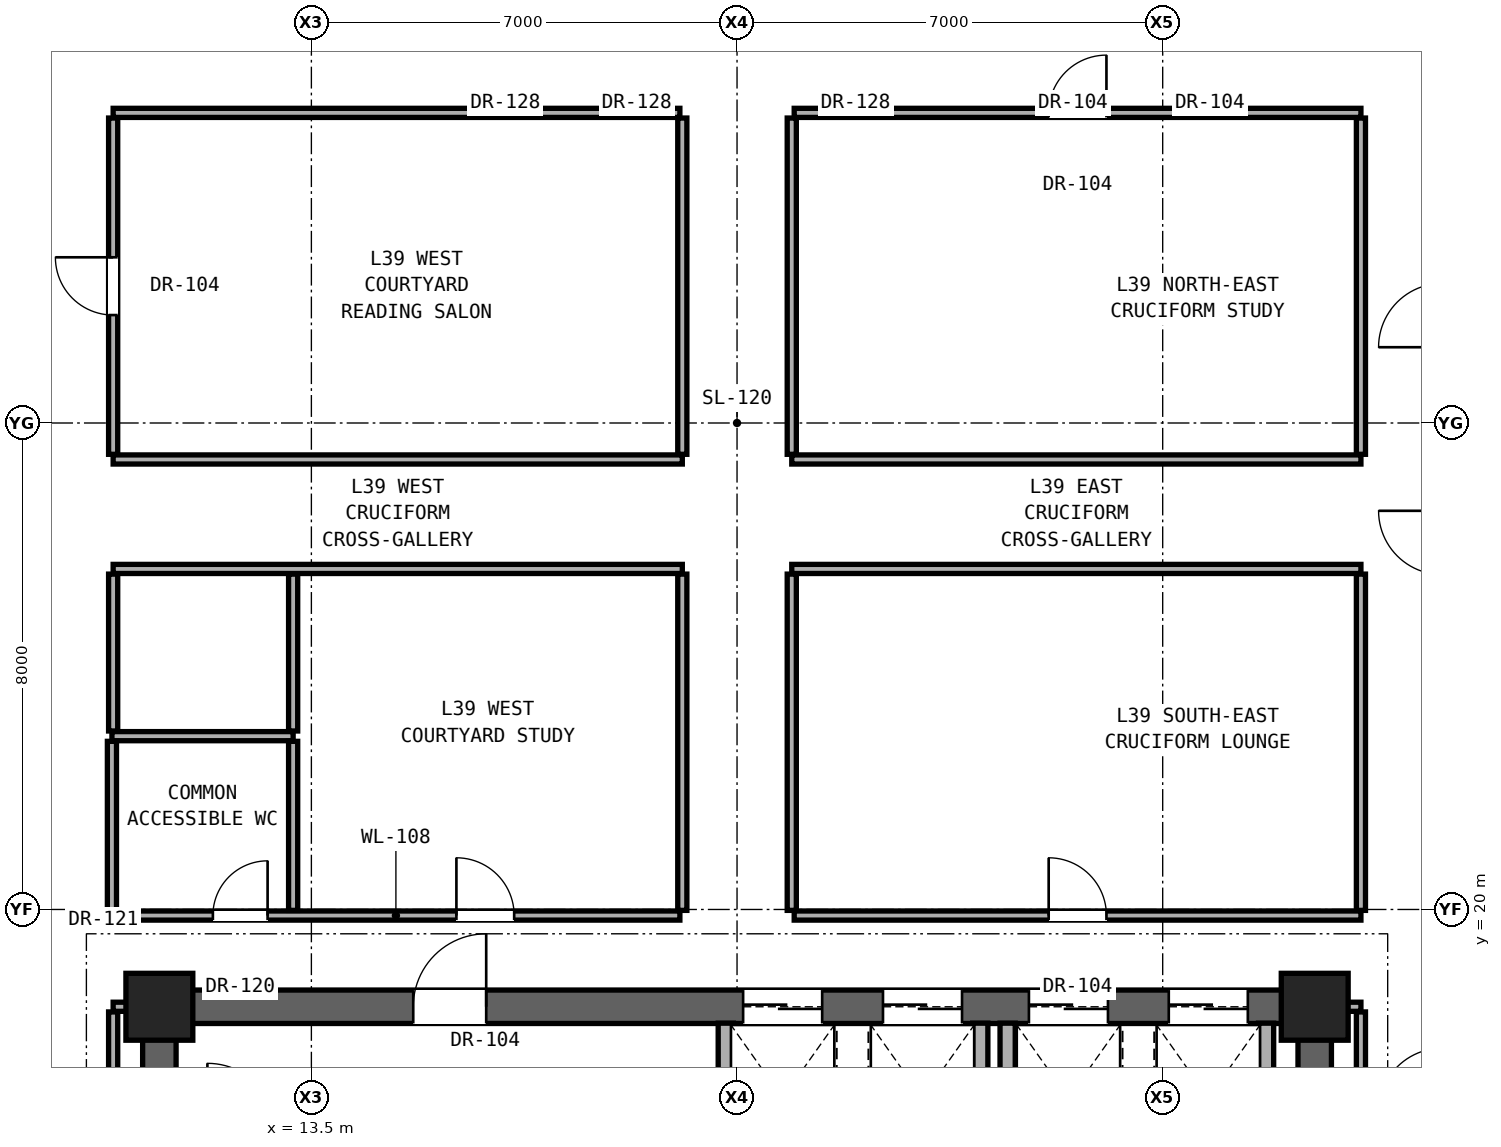
"""IFC4 building model, lengths in metres.
Left out: names, types, materials, properties, quantities, classifications, styles, units other than length and angle.
Written with IfcOpenShell. Run it as: python <this file> out.ifc"""

import sys

from ifc_helpers import new_model, si_unit, direction, frame, frame_2d, origin, origin_2d, place, context, subcontext, project, spatial, rectangle, extrude, element, fill, save


model = new_model("IFC4")
c1 = context("Model", 3, precision=1e-05, world=origin(), true_north=direction((0.0, 1.0)))
c2 = subcontext(c1, "Body", "Model", "MODEL_VIEW")
j1 = project(units=[si_unit("LENGTHUNIT", "METRE"), si_unit("PLANEANGLEUNIT", "RADIAN")], contexts=[c1])
p1 = place(None, origin())
s1 = spatial("IfcSite", under=j1, at=p1, CompositionType="ELEMENT")
p2 = place(p1, origin())
s2 = spatial("IfcBuilding", under=s1, at=p2, CompositionType="ELEMENT")
p3 = place(p2, frame((0.0, 0.0, 137.9)))
s3 = spatial("IfcBuildingStorey", under=s2, at=p3, CompositionType="ELEMENT", Elevation=137.9)
for number, where, z_axis, x_axis in (
    (1, (11.0, 18.4, 0.0), (0.0, 0.0, 1.0), (1.0, 0.0, 0.0)),
    (2, (30.0, 18.4, 0.0), (0.0, 0.0, 1.0), (1.0, 0.0, 0.0)),
):
    element("IfcColumn", number, at=place(p3, frame(where, z_axis=z_axis, x_axis=x_axis)), inside=s3, PredefinedType="COLUMN", context=c2, shape_type="SweptSolid", body=[
        extrude(rectangle(XDim=1.1, YDim=1.1, at=origin_2d()), origin(), (0.0, 0.0, 1.0), 3.3),
    ])
for number, where, z_axis, x_axis in (
    (3, (11.0, 12.4, 0.0), (0.0, 0.0, 1.0), (0.0, 1.0, 0.0)),
    (4, (30.0, 12.4, 0.0), (0.0, 0.0, 1.0), (0.0, 1.0, 0.0)),
):
    element("IfcWall", number, at=place(p3, frame(where, z_axis=z_axis, x_axis=x_axis)), inside=s3, PredefinedType="SHEAR", context=c2, shape_type="SweptSolid", body=[
        extrude(rectangle(XDim=6.0, YDim=0.55, at=frame_2d((3.0, 0.0))), origin(), (0.0, 0.0, 1.0), 3.08),
    ])
p4 = place(p3, frame((11.0, 18.4, 0.0), z_axis=(0.0, 0.0, 1.0), x_axis=(1.0, 0.0, 0.0)))
e5 = element("IfcWall", 5, at=p4, inside=s3, PredefinedType="SHEAR", context=c2, shape_type="SweptSolid", body=[
    extrude(rectangle(XDim=19.0, YDim=0.55, at=frame_2d((9.5, 0.0))), origin(), (0.0, 0.0, 1.0), 3.08),
])
p5 = place(p4, frame((4.175, 0.0, 0.0)))
e6 = element("IfcOpeningElement", 6, at=p5, cuts=e5, PredefinedType="OPENING", context=c2, shape_type="SweptSolid", body=[
    extrude(rectangle(XDim=1.2, YDim=2.25, at=frame_2d((0.6, 1.125))), frame((0.0, 0.285, 0.0), z_axis=(0.0, -1.0, 0.0), x_axis=(1.0, 0.0, 0.0)), (0.0, 0.0, 1.0), 0.57),
])
p6 = place(p4, frame((9.6, 0.0, 0.0)))
e7 = element("IfcOpeningElement", 7, at=p6, cuts=e5, PredefinedType="OPENING", context=c2, shape_type="SweptSolid", body=[
    extrude(rectangle(XDim=1.3, YDim=2.3, at=frame_2d((0.65, 1.15))), frame((0.0, 0.285, 0.0), z_axis=(0.0, -1.0, 0.0), x_axis=(1.0, 0.0, 0.0)), (0.0, 0.0, 1.0), 0.57),
])
p7 = place(p4, frame((11.9, 0.0, 0.0)))
e8 = element("IfcOpeningElement", 8, at=p7, cuts=e5, PredefinedType="OPENING", context=c2, shape_type="SweptSolid", body=[
    extrude(rectangle(XDim=1.3, YDim=2.3, at=frame_2d((0.65, 1.15))), frame((0.0, 0.285, 0.0), z_axis=(0.0, -1.0, 0.0), x_axis=(1.0, 0.0, 0.0)), (0.0, 0.0, 1.0), 0.57),
])
p8 = place(p4, frame((14.3, 0.0, 0.0)))
e9 = element("IfcOpeningElement", 9, at=p8, cuts=e5, PredefinedType="OPENING", context=c2, shape_type="SweptSolid", body=[
    extrude(rectangle(XDim=1.3, YDim=2.3, at=frame_2d((0.65, 1.15))), frame((0.0, 0.285, 0.0), z_axis=(0.0, -1.0, 0.0), x_axis=(1.0, 0.0, 0.0)), (0.0, 0.0, 1.0), 0.57),
])
p9 = place(p4, frame((16.6, 0.0, 0.0)))
e10 = element("IfcOpeningElement", 10, at=p9, cuts=e5, PredefinedType="OPENING", context=c2, shape_type="SweptSolid", body=[
    extrude(rectangle(XDim=1.3, YDim=2.3, at=frame_2d((0.65, 1.15))), frame((0.0, 0.285, 0.0), z_axis=(0.0, -1.0, 0.0), x_axis=(1.0, 0.0, 0.0)), (0.0, 0.0, 1.0), 0.57),
])
for number, where, z_axis, x_axis in (
    (11, (10.24, 18.4, 0.0), (0.0, 0.0, 1.0), (1.0, 0.0, 0.0)),
    (12, (30.27, 18.4, 0.0), (0.0, 0.0, 1.0), (1.0, 0.0, 0.0)),
):
    element("IfcWall", number, at=place(p3, frame(where, z_axis=z_axis, x_axis=x_axis)), inside=s3, PredefinedType="PARTITIONING", context=c2, shape_type="SweptSolid", body=[
        extrude(rectangle(XDim=0.49, YDim=0.15, at=frame_2d((0.245, 0.0))), origin(), (0.0, 0.0, 1.0), 2.456),
    ])
p10 = place(p3, frame((10.22, 19.9, 0.0), z_axis=(0.0, 0.0, 1.0), x_axis=(1.0, 0.0, 0.0)))
e13 = element("IfcWall", 13, at=p10, inside=s3, PredefinedType="PARTITIONING", context=c2, shape_type="SweptSolid", body=[
    extrude(rectangle(XDim=9.34, YDim=0.15, at=frame_2d((4.67, 0.0))), origin(), (0.0, 0.0, 1.0), 2.216),
])
p11 = place(p10, frame((1.66, 0.0, 0.0)))
e14 = element("IfcOpeningElement", 14, at=p11, cuts=e13, PredefinedType="OPENING", context=c2, shape_type="SweptSolid", body=[
    extrude(rectangle(XDim=0.9, YDim=2.1, at=frame_2d((0.45, 1.05))), frame((0.0, 0.085, 0.0), z_axis=(0.0, -1.0, 0.0), x_axis=(1.0, 0.0, 0.0)), (0.0, 0.0, 1.0), 0.17),
])
p12 = place(p10, frame((5.665, 0.0, 0.0)))
e15 = element("IfcOpeningElement", 15, at=p12, cuts=e13, PredefinedType="OPENING", context=c2, shape_type="SweptSolid", body=[
    extrude(rectangle(XDim=0.95, YDim=2.15, at=frame_2d((0.475, 1.075))), frame((0.0, 0.085, 0.0), z_axis=(0.0, -1.0, 0.0), x_axis=(1.0, 0.0, 0.0)), (0.0, 0.0, 1.0), 0.17),
])
p13 = place(p3, frame((21.44, 19.9, 0.0), z_axis=(0.0, 0.0, 1.0), x_axis=(1.0, 0.0, 0.0)))
e16 = element("IfcWall", 16, at=p13, inside=s3, PredefinedType="PARTITIONING", context=c2, shape_type="SweptSolid", body=[
    extrude(rectangle(XDim=9.32, YDim=0.15, at=frame_2d((4.66, 0.0))), origin(), (0.0, 0.0, 1.0), 2.216),
])
p14 = place(p13, frame((4.185, 0.0, 0.0)))
e17 = element("IfcOpeningElement", 17, at=p14, cuts=e16, PredefinedType="OPENING", context=c2, shape_type="SweptSolid", body=[
    extrude(rectangle(XDim=0.95, YDim=2.15, at=frame_2d((0.475, 1.075))), frame((0.0, 0.085, 0.0), z_axis=(0.0, -1.0, 0.0), x_axis=(1.0, 0.0, 0.0)), (0.0, 0.0, 1.0), 0.17),
])
p15 = place(p3, frame((10.22, 22.85, 0.0), z_axis=(0.0, 0.0, 1.0), x_axis=(1.0, 0.0, 0.0)))
e18 = element("IfcWall", 18, at=p15, inside=s3, PredefinedType="PARTITIONING", context=c2, shape_type="SweptSolid", body=[
    extrude(rectangle(XDim=2.98, YDim=0.15, at=frame_2d((1.49, 0.0))), origin(), (0.0, 0.0, 1.0), 2.216),
])
for number, where, z_axis, x_axis in (
    (19, (10.24, 25.6, 0.0), (0.0, 0.0, 1.0), (1.0, 0.0, 0.0)),
    (20, (21.4, 25.6, 0.0), (0.0, 0.0, 1.0), (1.0, 0.0, 0.0)),
    (21, (10.24, 27.4, 0.0), (0.0, 0.0, 1.0), (1.0, 0.0, 0.0)),
    (22, (21.4, 27.4, 0.0), (0.0, 0.0, 1.0), (1.0, 0.0, 0.0)),
):
    element("IfcWall", number, at=place(p3, frame(where, z_axis=z_axis, x_axis=x_axis)), inside=s3, PredefinedType="PARTITIONING", context=c2, shape_type="SweptSolid", body=[
        extrude(rectangle(XDim=9.36, YDim=0.15, at=frame_2d((4.68, 0.0))), origin(), (0.0, 0.0, 1.0), 2.216),
    ])
p16 = place(p3, frame((10.24, 33.1, 0.0), z_axis=(0.0, 0.0, 1.0), x_axis=(1.0, 0.0, 0.0)))
e23 = element("IfcWall", 23, at=p16, inside=s3, PredefinedType="PARTITIONING", context=c2, shape_type="SweptSolid", body=[
    extrude(rectangle(XDim=9.32, YDim=0.15, at=frame_2d((4.66, 0.0))), origin(), (0.0, 0.0, 1.0), 2.216),
])
p17 = place(p3, frame((21.44, 33.1, 0.0), z_axis=(0.0, 0.0, 1.0), x_axis=(1.0, 0.0, 0.0)))
e24 = element("IfcWall", 24, at=p17, inside=s3, PredefinedType="PARTITIONING", context=c2, shape_type="SweptSolid", body=[
    extrude(rectangle(XDim=9.32, YDim=0.15, at=frame_2d((4.66, 0.0))), origin(), (0.0, 0.0, 1.0), 2.216),
])
p18 = place(p17, frame((4.185, 0.0, 0.0)))
e25 = element("IfcOpeningElement", 25, at=p18, cuts=e24, PredefinedType="OPENING", context=c2, shape_type="SweptSolid", body=[
    extrude(rectangle(XDim=0.95, YDim=2.15, at=frame_2d((0.475, 1.075))), frame((0.0, 0.085, 0.0), z_axis=(0.0, -1.0, 0.0), x_axis=(1.0, 0.0, 0.0)), (0.0, 0.0, 1.0), 0.17),
])
p19 = place(p3, frame((10.22, 19.985, 0.0), z_axis=(0.0, 0.0, 1.0), x_axis=(0.0, 1.0, 0.0)))
e26 = element("IfcWall", 26, at=p19, inside=s3, PredefinedType="PARTITIONING", context=c2, shape_type="SweptSolid", body=[
    extrude(rectangle(XDim=2.78, YDim=0.15, at=frame_2d((1.39, 0.0))), origin(), (0.0, 0.0, 1.0), 3.08),
])
p20 = place(p3, frame((10.24, 12.335, 0.0), z_axis=(0.0, 0.0, 1.0), x_axis=(0.0, 1.0, 0.0)))
e27 = element("IfcWall", 27, at=p20, inside=s3, PredefinedType="PARTITIONING", context=c2, shape_type="SweptSolid", body=[
    extrude(rectangle(XDim=5.98, YDim=0.15, at=frame_2d((2.99, 0.0))), origin(), (0.0, 0.0, 1.0), 2.456),
])
p21 = place(p3, frame((10.24, 22.935, 0.0), z_axis=(0.0, 0.0, 1.0), x_axis=(0.0, 1.0, 0.0)))
e28 = element("IfcWall", 28, at=p21, inside=s3, PredefinedType="PARTITIONING", context=c2, shape_type="SweptSolid", body=[
    extrude(rectangle(XDim=2.58, YDim=0.15, at=frame_2d((1.29, 0.0))), origin(), (0.0, 0.0, 1.0), 2.299),
])
p22 = place(p3, frame((10.24, 27.485, 0.0), z_axis=(0.0, 0.0, 1.0), x_axis=(0.0, 1.0, 0.0)))
e29 = element("IfcWall", 29, at=p22, inside=s3, PredefinedType="PARTITIONING", context=c2, shape_type="SweptSolid", body=[
    extrude(rectangle(XDim=5.53, YDim=0.15, at=frame_2d((2.765, 0.0))), origin(), (0.0, 0.0, 1.0), 2.299),
])
p23 = place(p22, frame((2.29, 0.0, 0.0)))
e30 = element("IfcOpeningElement", 30, at=p23, cuts=e29, PredefinedType="OPENING", context=c2, shape_type="SweptSolid", body=[
    extrude(rectangle(XDim=0.95, YDim=2.15, at=frame_2d((0.475, 1.075))), frame((0.0, 0.085, 0.0), z_axis=(0.0, -1.0, 0.0), x_axis=(1.0, 0.0, 0.0)), (0.0, 0.0, 1.0), 0.17),
])
p24 = place(p3, frame((13.2, 19.985, 0.0), z_axis=(0.0, 0.0, 1.0), x_axis=(0.0, 1.0, 0.0)))
e31 = element("IfcWall", 31, at=p24, inside=s3, PredefinedType="PARTITIONING", context=c2, shape_type="SweptSolid", body=[
    extrude(rectangle(XDim=2.78, YDim=0.15, at=frame_2d((1.39, 0.0))), origin(), (0.0, 0.0, 1.0), 3.08),
])
p25 = place(p3, frame((13.2, 22.935, 0.0), z_axis=(0.0, 0.0, 1.0), x_axis=(0.0, 1.0, 0.0)))
e32 = element("IfcWall", 32, at=p25, inside=s3, PredefinedType="PARTITIONING", context=c2, shape_type="SweptSolid", body=[
    extrude(rectangle(XDim=2.58, YDim=0.15, at=frame_2d((1.29, 0.0))), origin(), (0.0, 0.0, 1.0), 2.216),
])
for number, where, z_axis, x_axis in (
    (33, (19.6, 19.985, 0.0), (0.0, 0.0, 1.0), (0.0, 1.0, 0.0)),
    (34, (19.6, 27.485, 0.0), (0.0, 0.0, 1.0), (0.0, 1.0, 0.0)),
):
    element("IfcWall", number, at=place(p3, frame(where, z_axis=z_axis, x_axis=x_axis)), inside=s3, PredefinedType="PARTITIONING", context=c2, shape_type="SweptSolid", body=[
        extrude(rectangle(XDim=5.53, YDim=0.15, at=frame_2d((2.765, 0.0))), origin(), (0.0, 0.0, 1.0), 2.216),
    ])
p26 = place(p3, frame((20.315, 16.555, 0.0), z_axis=(0.0, 0.0, 1.0), x_axis=(0.0, 1.0, 0.0)))
e35 = element("IfcWall", 35, at=p26, inside=s3, PredefinedType="SOLIDWALL", context=c2, shape_type="SweptSolid", body=[
    extrude(rectangle(XDim=1.575, YDim=0.25, at=frame_2d((0.788, 0.0))), origin(), (0.0, 0.0, 1.0), 3.08),
])
for number, where, z_axis, x_axis in (
    (36, (21.4, 19.985, 0.0), (0.0, 0.0, 1.0), (0.0, 1.0, 0.0)),
    (37, (21.4, 27.485, 0.0), (0.0, 0.0, 1.0), (0.0, 1.0, 0.0)),
):
    element("IfcWall", number, at=place(p3, frame(where, z_axis=z_axis, x_axis=x_axis)), inside=s3, PredefinedType="PARTITIONING", context=c2, shape_type="SweptSolid", body=[
        extrude(rectangle(XDim=5.53, YDim=0.15, at=frame_2d((2.765, 0.0))), origin(), (0.0, 0.0, 1.0), 2.216),
    ])
for number, where, z_axis, x_axis in (
    (38, (24.5, 15.785, 0.0), (0.0, 0.0, 1.0), (0.0, 1.0, 0.0)),
    (39, (24.95, 15.785, 0.0), (0.0, 0.0, 1.0), (0.0, 1.0, 0.0)),
    (40, (29.2, 15.785, 0.0), (0.0, 0.0, 1.0), (0.0, 1.0, 0.0)),
):
    element("IfcWall", number, at=place(p3, frame(where, z_axis=z_axis, x_axis=x_axis)), inside=s3, PredefinedType="SOLIDWALL", context=c2, shape_type="SweptSolid", body=[
        extrude(rectangle(XDim=2.345, YDim=0.25, at=frame_2d((1.172, 0.0))), origin(), (0.0, 0.0, 1.0), 3.08),
    ])
p27 = place(p3, frame((30.76, 12.335, 0.0), z_axis=(0.0, 0.0, 1.0), x_axis=(0.0, 1.0, 0.0)))
e41 = element("IfcWall", 41, at=p27, inside=s3, PredefinedType="PARTITIONING", context=c2, shape_type="SweptSolid", body=[
    extrude(rectangle(XDim=5.98, YDim=0.15, at=frame_2d((2.99, 0.0))), origin(), (0.0, 0.0, 1.0), 2.456),
])
for number, where, z_axis, x_axis in (
    (42, (30.76, 19.985, 0.0), (0.0, 0.0, 1.0), (0.0, 1.0, 0.0)),
    (43, (30.76, 27.485, 0.0), (0.0, 0.0, 1.0), (0.0, 1.0, 0.0)),
):
    element("IfcWall", number, at=place(p3, frame(where, z_axis=z_axis, x_axis=x_axis)), inside=s3, PredefinedType="PARTITIONING", context=c2, shape_type="SweptSolid", body=[
        extrude(rectangle(XDim=5.53, YDim=0.15, at=frame_2d((2.765, 0.0))), origin(), (0.0, 0.0, 1.0), 2.299),
    ])
p28 = place(p5, origin())
e44 = element("IfcDoor", 44, at=p28, inside=s3, OperationType="SINGLE_SWING_RIGHT", PredefinedType="DOOR", context=c2, shape_type="SweptSolid", body=[
    extrude(rectangle(XDim=1.2, YDim=2.25, at=frame_2d((0.6, 1.125))), frame((0.0, 0.025, 0.0), z_axis=(0.0, -1.0, 0.0), x_axis=(1.0, 0.0, 0.0)), (0.0, 0.0, 1.0), 0.05),
])
fill(e6, e44)
p29 = place(p11, origin())
e45 = element("IfcDoor", 45, at=p29, inside=s3, OperationType="SINGLE_SWING_RIGHT", PredefinedType="DOOR", context=c2, shape_type="SweptSolid", body=[
    extrude(rectangle(XDim=0.9, YDim=2.1, at=frame_2d((0.45, 1.05))), frame((0.0, 0.025, 0.0), z_axis=(0.0, -1.0, 0.0), x_axis=(1.0, 0.0, 0.0)), (0.0, 0.0, 1.0), 0.05),
])
fill(e14, e45)
p30 = place(p12, origin())
e46 = element("IfcDoor", 46, at=p30, inside=s3, OperationType="SINGLE_SWING_LEFT", PredefinedType="DOOR", context=c2, shape_type="SweptSolid", body=[
    extrude(rectangle(XDim=0.95, YDim=2.15, at=frame_2d((0.475, 1.075))), frame((0.0, 0.025, 0.0), z_axis=(0.0, -1.0, 0.0), x_axis=(1.0, 0.0, 0.0)), (0.0, 0.0, 1.0), 0.05),
])
fill(e15, e46)
p31 = place(p23, origin())
e47 = element("IfcDoor", 47, at=p31, inside=s3, OperationType="SINGLE_SWING_RIGHT", PredefinedType="DOOR", context=c2, shape_type="SweptSolid", body=[
    extrude(rectangle(XDim=0.95, YDim=2.15, at=frame_2d((0.475, 1.075))), frame((0.0, 0.025, 0.0), z_axis=(0.0, -1.0, 0.0), x_axis=(1.0, 0.0, 0.0)), (0.0, 0.0, 1.0), 0.05),
])
fill(e30, e47)
p32 = place(p14, origin())
e48 = element("IfcDoor", 48, at=p32, inside=s3, OperationType="SINGLE_SWING_LEFT", PredefinedType="DOOR", context=c2, shape_type="SweptSolid", body=[
    extrude(rectangle(XDim=0.95, YDim=2.15, at=frame_2d((0.475, 1.075))), frame((0.0, 0.025, 0.0), z_axis=(0.0, -1.0, 0.0), x_axis=(1.0, 0.0, 0.0)), (0.0, 0.0, 1.0), 0.05),
])
fill(e17, e48)
p33 = place(p18, origin())
e49 = element("IfcDoor", 49, at=p33, inside=s3, OperationType="SINGLE_SWING_RIGHT", PredefinedType="DOOR", context=c2, shape_type="SweptSolid", body=[
    extrude(rectangle(XDim=0.95, YDim=2.15, at=frame_2d((0.475, 1.075))), frame((0.0, 0.025, 0.0), z_axis=(0.0, -1.0, 0.0), x_axis=(1.0, 0.0, 0.0)), (0.0, 0.0, 1.0), 0.05),
])
fill(e25, e49)
p34 = place(p6, origin())
e50 = element("IfcDoor", 50, at=p34, inside=s3, OperationType="DOUBLE_DOOR_SLIDING", PredefinedType="DOOR", context=c2, shape_type="SweptSolid", body=[
    extrude(rectangle(XDim=1.3, YDim=2.3, at=frame_2d((0.65, 1.15))), frame((0.0, 0.025, 0.0), z_axis=(0.0, -1.0, 0.0), x_axis=(1.0, 0.0, 0.0)), (0.0, 0.0, 1.0), 0.05),
])
fill(e7, e50)
p35 = place(p7, origin())
e51 = element("IfcDoor", 51, at=p35, inside=s3, OperationType="DOUBLE_DOOR_SLIDING", PredefinedType="DOOR", context=c2, shape_type="SweptSolid", body=[
    extrude(rectangle(XDim=1.3, YDim=2.3, at=frame_2d((0.65, 1.15))), frame((0.0, 0.025, 0.0), z_axis=(0.0, -1.0, 0.0), x_axis=(1.0, 0.0, 0.0)), (0.0, 0.0, 1.0), 0.05),
])
fill(e8, e51)
p36 = place(p8, origin())
e52 = element("IfcDoor", 52, at=p36, inside=s3, OperationType="DOUBLE_DOOR_SLIDING", PredefinedType="DOOR", context=c2, shape_type="SweptSolid", body=[
    extrude(rectangle(XDim=1.3, YDim=2.3, at=frame_2d((0.65, 1.15))), frame((0.0, 0.025, 0.0), z_axis=(0.0, -1.0, 0.0), x_axis=(1.0, 0.0, 0.0)), (0.0, 0.0, 1.0), 0.05),
])
fill(e9, e52)
p37 = place(p9, origin())
e53 = element("IfcDoor", 53, at=p37, inside=s3, OperationType="DOUBLE_DOOR_SLIDING", PredefinedType="DOOR", context=c2, shape_type="SweptSolid", body=[
    extrude(rectangle(XDim=1.3, YDim=2.3, at=frame_2d((0.65, 1.15))), frame((0.0, 0.025, 0.0), z_axis=(0.0, -1.0, 0.0), x_axis=(1.0, 0.0, 0.0)), (0.0, 0.0, 1.0), 0.05),
])
fill(e10, e53)
save(model, sys.argv[1])
